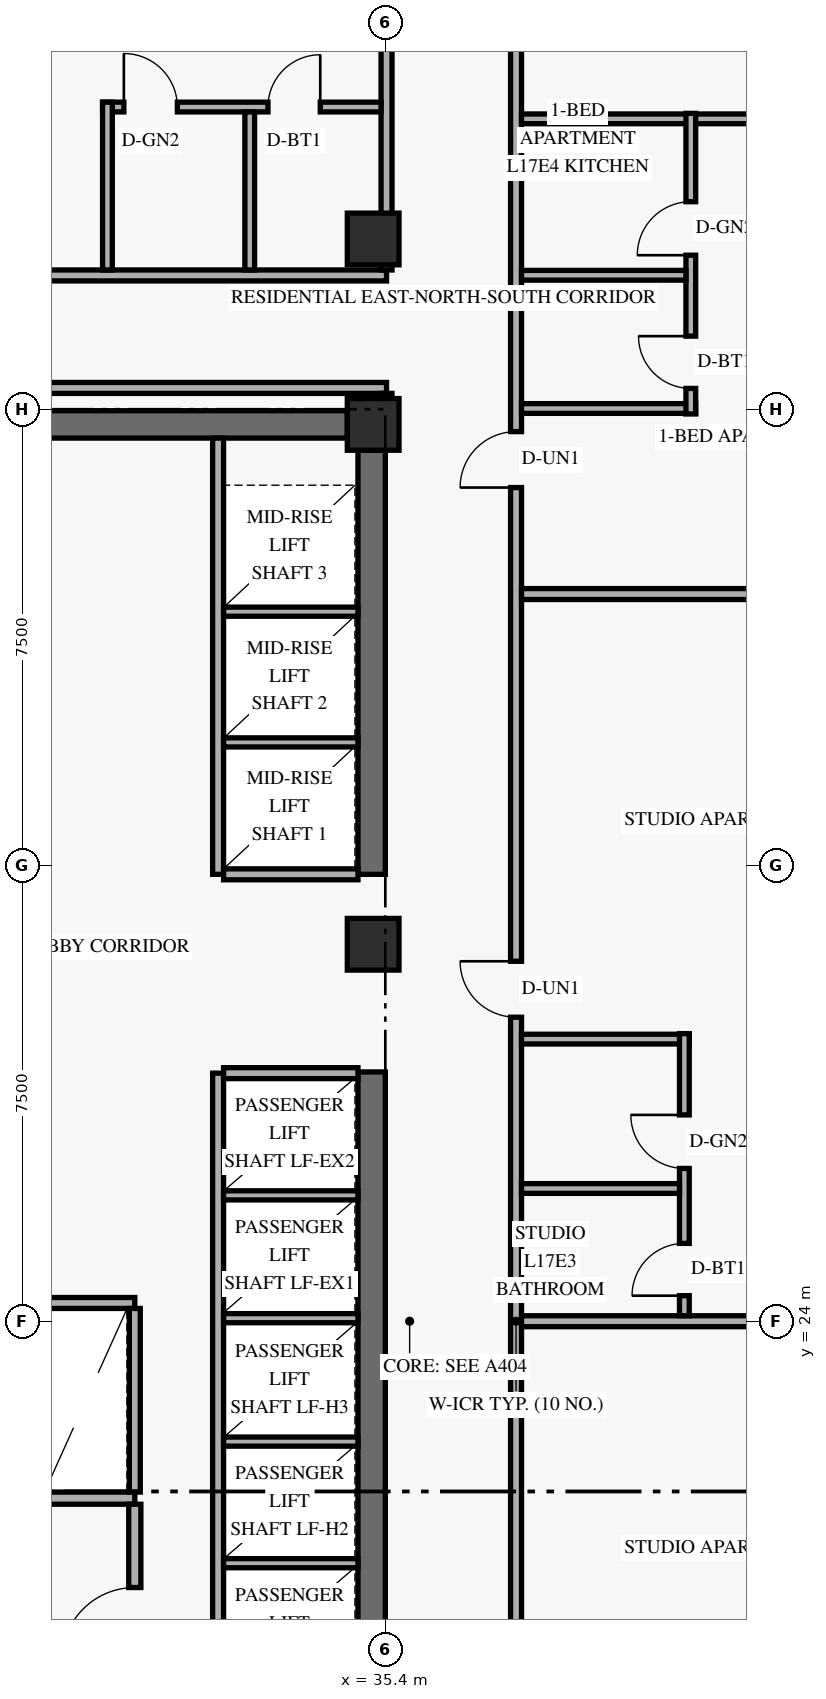
"""IFC4 building model, lengths in metres.
Left out: names, types, materials, properties, quantities, classifications, styles, units other than length and angle.
Written with IfcOpenShell. Run it as: python <this file> out.ifc"""

import sys

from ifc_helpers import new_model, si_unit, direction, frame, frame_2d, origin, origin_2d, place, context, subcontext, project, spatial, rectangle, extrude, element, fill, save


model = new_model("IFC4")
c1 = context("Model", 3, precision=1e-05, world=origin(), true_north=direction((0.0, 1.0)))
c2 = subcontext(c1, "Body", "Model", "MODEL_VIEW")
j1 = project(units=[si_unit("LENGTHUNIT", "METRE"), si_unit("PLANEANGLEUNIT", "RADIAN")], contexts=[c1])
p1 = place(None, origin())
s1 = spatial("IfcSite", under=j1, at=p1, CompositionType="ELEMENT")
p2 = place(p1, origin())
s2 = spatial("IfcBuilding", under=s1, at=p2, CompositionType="ELEMENT")
p3 = place(p2, frame((0.0, 0.0, 67.8)))
s3 = spatial("IfcBuildingStorey", under=s2, at=p3, CompositionType="ELEMENT", Elevation=67.8)
p4 = place(p3, frame((35.175, 17.975, 0.0), z_axis=(0.0, 0.0, 1.0), x_axis=(0.0, 1.0, 0.0)))
e1 = element("IfcWall", 1, at=p4, inside=s3, PredefinedType="SHEAR", context=c2, shape_type="SweptSolid", body=[
    extrude(rectangle(XDim=10.125, YDim=0.45, at=frame_2d((5.062, 0.0))), origin(), (0.0, 0.0, 1.0), 2.607),
])
p5 = place(p3, frame((35.175, 31.35, 0.0), z_axis=(0.0, 0.0, 1.0), x_axis=(0.0, 1.0, 0.0)))
e2 = element("IfcWall", 2, at=p5, inside=s3, PredefinedType="SHEAR", context=c2, shape_type="SweptSolid", body=[
    extrude(rectangle(XDim=6.975, YDim=0.45, at=frame_2d((3.487, 0.0))), origin(), (0.0, 0.0, 1.0), 2.607),
])
p6 = place(p3, frame((24.625, 38.75, 0.0), z_axis=(0.0, 0.0, 1.0), x_axis=(1.0, 0.0, 0.0)))
e3 = element("IfcWall", 3, at=p6, inside=s3, PredefinedType="SHEAR", context=c2, shape_type="SweptSolid", body=[
    extrude(rectangle(XDim=10.15, YDim=0.45, at=frame_2d((5.075, 0.0))), origin(), (0.0, 0.0, 1.0), 3.3),
])
for number, where, z_axis, x_axis in (
    (4, (35.2, 30.2, 0.0), (0.0, 0.0, 1.0), (1.0, 0.0, 0.0)),
    (5, (35.2, 38.75, 0.0), (0.0, 0.0, 1.0), (1.0, 0.0, 0.0)),
    (6, (35.2, 41.8, 0.0), (0.0, 0.0, 1.0), (1.0, 0.0, 0.0)),
):
    element("IfcColumn", number, at=place(p3, frame(where, z_axis=z_axis, x_axis=x_axis)), inside=s3, PredefinedType="COLUMN", context=c2, shape_type="SweptSolid", body=[
        extrude(rectangle(XDim=0.85, YDim=0.85, at=origin_2d()), origin(), (0.0, 0.0, 1.0), 3.6),
    ])
p7 = place(p3, frame((24.45, 21.09, 0.0), z_axis=(0.0, 0.0, 1.0), x_axis=(1.0, 0.0, 0.0)))
e7 = element("IfcWall", 7, at=p7, inside=s3, PredefinedType="STANDARD", context=c2, shape_type="SweptSolid", body=[
    extrude(rectangle(XDim=6.83, YDim=0.2, at=frame_2d((3.415, 0.0))), origin(), (0.0, 0.0, 1.0), 3.3),
])
p8 = place(p7, frame((0.72, 0.0, 0.0)))
e8 = element("IfcOpeningElement", 8, at=p8, cuts=e7, PredefinedType="OPENING", context=c2, shape_type="SweptSolid", body=[
    extrude(rectangle(XDim=1.1, YDim=2.2, at=frame_2d((0.55, 1.1))), frame((0.0, 0.11, 0.0), z_axis=(0.0, -1.0, 0.0), x_axis=(1.0, 0.0, 0.0)), (0.0, 0.0, 1.0), 0.22),
])
p9 = place(p7, frame((3.32, 0.0, 0.0)))
e9 = element("IfcOpeningElement", 9, at=p9, cuts=e7, PredefinedType="OPENING", context=c2, shape_type="SweptSolid", body=[
    extrude(rectangle(XDim=1.1, YDim=2.2, at=frame_2d((0.55, 1.1))), frame((0.0, 0.11, 0.0), z_axis=(0.0, -1.0, 0.0), x_axis=(1.0, 0.0, 0.0)), (0.0, 0.0, 1.0), 0.22),
])
p10 = place(p3, frame((31.28, 17.07, 0.0), z_axis=(0.0, 0.0, 1.0), x_axis=(0.0, 1.0, 0.0)))
e10 = element("IfcWall", 10, at=p10, inside=s3, PredefinedType="STANDARD", context=c2, shape_type="SweptSolid", body=[
    extrude(rectangle(XDim=3.92, YDim=0.2, at=frame_2d((1.96, 0.0))), origin(), (0.0, 0.0, 1.0), 2.589),
])
p11 = place(p10, frame((1.35, 0.0, 0.0)))
e11 = element("IfcOpeningElement", 11, at=p11, cuts=e10, PredefinedType="OPENING", context=c2, shape_type="SweptSolid", body=[
    extrude(rectangle(XDim=1.2, YDim=2.15, at=frame_2d((0.6, 1.075))), frame((0.0, 0.11, 0.0), z_axis=(0.0, -1.0, 0.0), x_axis=(1.0, 0.0, 0.0)), (0.0, 0.0, 1.0), 0.22),
])
p12 = place(p3, frame((24.45, 24.3, 0.0), z_axis=(0.0, 0.0, 1.0), x_axis=(1.0, 0.0, 0.0)))
e12 = element("IfcWall", 12, at=p12, inside=s3, PredefinedType="STANDARD", context=c2, shape_type="SweptSolid", body=[
    extrude(rectangle(XDim=6.83, YDim=0.18, at=frame_2d((3.415, 0.0))), origin(), (0.0, 0.0, 1.0), 3.3),
])
p13 = place(p3, frame((31.28, 21.19, 0.0), z_axis=(0.0, 0.0, 1.0), x_axis=(0.0, 1.0, 0.0)))
e13 = element("IfcWall", 13, at=p13, inside=s3, PredefinedType="STANDARD", context=c2, shape_type="SweptSolid", body=[
    extrude(rectangle(XDim=3.02, YDim=0.18, at=frame_2d((1.51, 0.0))), origin(), (0.0, 0.0, 1.0), 3.3),
])
p14 = place(p3, frame((32.65, 18.02, 0.0), z_axis=(0.0, 0.0, 1.0), x_axis=(0.0, 1.0, 0.0)))
e14 = element("IfcWall", 14, at=p14, inside=s3, PredefinedType="STANDARD", context=c2, shape_type="SweptSolid", body=[
    extrude(rectangle(XDim=10.06, YDim=0.18, at=frame_2d((5.03, 0.0))), origin(), (0.0, 0.0, 1.0), 3.3),
])
p15 = place(p3, frame((32.74, 28.08, 0.0), z_axis=(0.0, 0.0, 1.0), x_axis=(1.0, 0.0, 0.0)))
e15 = element("IfcWall", 15, at=p15, inside=s3, PredefinedType="STANDARD", context=c2, shape_type="SweptSolid", body=[
    extrude(rectangle(XDim=2.21, YDim=0.18, at=frame_2d((1.105, 0.0))), origin(), (0.0, 0.0, 1.0), 3.3),
])
for number, where, z_axis, x_axis in (
    (16, (32.74, 20.02, 0.0), (0.0, 0.0, 1.0), (1.0, 0.0, 0.0)),
    (17, (32.74, 22.02, 0.0), (0.0, 0.0, 1.0), (1.0, 0.0, 0.0)),
    (18, (32.74, 24.05, 0.0), (0.0, 0.0, 1.0), (1.0, 0.0, 0.0)),
    (19, (32.74, 26.07, 0.0), (0.0, 0.0, 1.0), (1.0, 0.0, 0.0)),
):
    element("IfcWall", number, at=place(p3, frame(where, z_axis=z_axis, x_axis=x_axis)), inside=s3, PredefinedType="STANDARD", context=c2, shape_type="SweptSolid", body=[
        extrude(rectangle(XDim=2.21, YDim=0.15, at=frame_2d((1.105, 0.0))), origin(), (0.0, 0.0, 1.0), 3.3),
    ])
p16 = place(p3, frame((32.65, 31.35, 0.0), z_axis=(0.0, 0.0, 1.0), x_axis=(0.0, 1.0, 0.0)))
e20 = element("IfcWall", 20, at=p16, inside=s3, PredefinedType="STANDARD", context=c2, shape_type="SweptSolid", body=[
    extrude(rectangle(XDim=7.175, YDim=0.18, at=frame_2d((3.587, 0.0))), origin(), (0.0, 0.0, 1.0), 3.3),
])
p17 = place(p3, frame((32.74, 31.35, 0.0), z_axis=(0.0, 0.0, 1.0), x_axis=(1.0, 0.0, 0.0)))
e21 = element("IfcWall", 21, at=p17, inside=s3, PredefinedType="STANDARD", context=c2, shape_type="SweptSolid", body=[
    extrude(rectangle(XDim=2.21, YDim=0.18, at=frame_2d((1.105, 0.0))), origin(), (0.0, 0.0, 1.0), 3.3),
])
for number, where, z_axis, x_axis in (
    (22, (32.74, 33.52, 0.0), (0.0, 0.0, 1.0), (1.0, 0.0, 0.0)),
    (23, (32.74, 35.67, 0.0), (0.0, 0.0, 1.0), (1.0, 0.0, 0.0)),
):
    element("IfcWall", number, at=place(p3, frame(where, z_axis=z_axis, x_axis=x_axis)), inside=s3, PredefinedType="STANDARD", context=c2, shape_type="SweptSolid", body=[
        extrude(rectangle(XDim=2.21, YDim=0.15, at=frame_2d((1.105, 0.0))), origin(), (0.0, 0.0, 1.0), 3.3),
    ])
p18 = place(p3, frame((37.55, 1.29, 0.0), z_axis=(0.0, 0.0, 1.0), x_axis=(0.0, 1.0, 0.0)))
e24 = element("IfcWall", 24, at=p18, inside=s3, PredefinedType="STANDARD", context=c2, shape_type="SweptSolid", body=[
    extrude(rectangle(XDim=45.42, YDim=0.18, at=frame_2d((22.71, 0.0))), origin(), (0.0, 0.0, 1.0), 2.589),
])
p19 = place(p18, frame((4.81, 0.0, 0.0)))
e25 = element("IfcOpeningElement", 25, at=p19, cuts=e24, PredefinedType="OPENING", context=c2, shape_type="SweptSolid", body=[
    extrude(rectangle(XDim=0.92, YDim=2.15, at=frame_2d((0.46, 1.075))), frame((0.0, 0.1, 0.0), z_axis=(0.0, -1.0, 0.0), x_axis=(1.0, 0.0, 0.0)), (0.0, 0.0, 1.0), 0.2),
])
p20 = place(p18, frame((15.75, 0.0, 0.0)))
e26 = element("IfcOpeningElement", 26, at=p20, cuts=e24, PredefinedType="OPENING", context=c2, shape_type="SweptSolid", body=[
    extrude(rectangle(XDim=0.92, YDim=2.15, at=frame_2d((0.46, 1.075))), frame((0.0, 0.1, 0.0), z_axis=(0.0, -1.0, 0.0), x_axis=(1.0, 0.0, 0.0)), (0.0, 0.0, 1.0), 0.2),
])
p21 = place(p18, frame((27.71, 0.0, 0.0)))
e27 = element("IfcOpeningElement", 27, at=p21, cuts=e24, PredefinedType="OPENING", context=c2, shape_type="SweptSolid", body=[
    extrude(rectangle(XDim=0.92, YDim=2.15, at=frame_2d((0.46, 1.075))), frame((0.0, 0.1, 0.0), z_axis=(0.0, -1.0, 0.0), x_axis=(1.0, 0.0, 0.0)), (0.0, 0.0, 1.0), 0.2),
])
p22 = place(p18, frame((36.422, 0.0, 0.0)))
e28 = element("IfcOpeningElement", 28, at=p22, cuts=e24, PredefinedType="OPENING", context=c2, shape_type="SweptSolid", body=[
    extrude(rectangle(XDim=0.92, YDim=2.15, at=frame_2d((0.46, 1.075))), frame((0.0, 0.1, 0.0), z_axis=(0.0, -1.0, 0.0), x_axis=(1.0, 0.0, 0.0)), (0.0, 0.0, 1.0), 0.2),
])
p23 = place(p3, frame((14.1, 41.2, 0.0), z_axis=(0.0, 0.0, 1.0), x_axis=(1.0, 0.0, 0.0)))
e29 = element("IfcWall", 29, at=p23, inside=s3, PredefinedType="STANDARD", context=c2, shape_type="SweptSolid", body=[
    extrude(rectangle(XDim=21.32, YDim=0.18, at=frame_2d((10.66, 0.0))), origin(), (0.0, 0.0, 1.0), 2.589),
])
p24 = place(p23, frame((0.44, 0.0, 0.0)))
e30 = element("IfcOpeningElement", 30, at=p24, cuts=e29, PredefinedType="OPENING", context=c2, shape_type="SweptSolid", body=[
    extrude(rectangle(XDim=0.92, YDim=2.15, at=frame_2d((0.46, 1.075))), frame((0.0, 0.1, 0.0), z_axis=(0.0, -1.0, 0.0), x_axis=(1.0, 0.0, 0.0)), (0.0, 0.0, 1.0), 0.2),
])
p25 = place(p23, frame((10.631, 0.0, 0.0)))
e31 = element("IfcOpeningElement", 31, at=p25, cuts=e29, PredefinedType="OPENING", context=c2, shape_type="SweptSolid", body=[
    extrude(rectangle(XDim=0.95, YDim=2.15, at=frame_2d((0.475, 1.075))), frame((0.0, 0.1, 0.0), z_axis=(0.0, -1.0, 0.0), x_axis=(1.0, 0.0, 0.0)), (0.0, 0.0, 1.0), 0.2),
])
p26 = place(p23, frame((14.511, 0.0, 0.0)))
e32 = element("IfcOpeningElement", 32, at=p26, cuts=e29, PredefinedType="OPENING", context=c2, shape_type="SweptSolid", body=[
    extrude(rectangle(XDim=0.92, YDim=2.15, at=frame_2d((0.46, 1.075))), frame((0.0, 0.1, 0.0), z_axis=(0.0, -1.0, 0.0), x_axis=(1.0, 0.0, 0.0)), (0.0, 0.0, 1.0), 0.2),
])
p27 = place(p3, frame((23.75, 39.35, 0.0), z_axis=(0.0, 0.0, 1.0), x_axis=(1.0, 0.0, 0.0)))
e33 = element("IfcWall", 33, at=p27, inside=s3, PredefinedType="STANDARD", context=c2, shape_type="SweptSolid", body=[
    extrude(rectangle(XDim=11.67, YDim=0.18, at=frame_2d((5.835, 0.0))), origin(), (0.0, 0.0, 1.0), 2.589),
])
p28 = place(p3, frame((35.42, 38.75, 0.0), z_axis=(0.0, 0.0, 1.0), x_axis=(0.0, 1.0, 0.0)))
e34 = element("IfcWall", 34, at=p28, inside=s3, PredefinedType="STANDARD", context=c2, shape_type="SweptSolid", body=[
    extrude(rectangle(XDim=0.51, YDim=0.18, at=frame_2d((0.255, 0.0))), origin(), (0.0, 0.0, 1.0), 3.3),
])
p29 = place(p3, frame((35.42, 41.29, 0.0), z_axis=(0.0, 0.0, 1.0), x_axis=(0.0, 1.0, 0.0)))
e35 = element("IfcWall", 35, at=p29, inside=s3, PredefinedType="PARTITIONING", context=c2, shape_type="SweptSolid", body=[
    extrude(rectangle(XDim=5.42, YDim=0.18, at=frame_2d((2.71, 0.0))), origin(), (0.0, 0.0, 1.0), 3.3),
])
p30 = place(p3, frame((37.64, 24.0, 0.0), z_axis=(0.0, 0.0, 1.0), x_axis=(1.0, 0.0, 0.0)))
e36 = element("IfcWall", 36, at=p30, inside=s3, PredefinedType="PARTITIONING", context=c2, shape_type="SweptSolid", body=[
    extrude(rectangle(XDim=10.67, YDim=0.18, at=frame_2d((5.335, 0.0))), origin(), (0.0, 0.0, 1.0), 2.589),
])
p31 = place(p3, frame((37.64, 28.64, 0.0), z_axis=(0.0, 0.0, 1.0), x_axis=(1.0, 0.0, 0.0)))
e37 = element("IfcWall", 37, at=p31, inside=s3, PredefinedType="PLUMBINGWALL", context=c2, shape_type="SweptSolid", body=[
    extrude(rectangle(XDim=2.758, YDim=0.16, at=frame_2d((1.379, 0.0))), origin(), (0.0, 0.0, 1.0), 3.3),
])
p32 = place(p3, frame((40.318, 24.09, 0.0), z_axis=(0.0, 0.0, 1.0), x_axis=(0.0, 1.0, 0.0)))
e38 = element("IfcWall", 38, at=p32, inside=s3, PredefinedType="PLUMBINGWALL", context=c2, shape_type="SweptSolid", body=[
    extrude(rectangle(XDim=4.64, YDim=0.16, at=frame_2d((2.32, 0.0))), origin(), (0.0, 0.0, 1.0), 3.3),
])
p33 = place(p32, frame((0.33, 0.0, 0.0)))
e39 = element("IfcOpeningElement", 39, at=p33, cuts=e38, PredefinedType="OPENING", context=c2, shape_type="SweptSolid", body=[
    extrude(rectangle(XDim=0.86, YDim=2.12, at=frame_2d((0.43, 1.06))), frame((0.0, 0.09, 0.0), z_axis=(0.0, -1.0, 0.0), x_axis=(1.0, 0.0, 0.0)), (0.0, 0.0, 1.0), 0.18),
])
p34 = place(p32, frame((2.423, 0.0, 0.0)))
e40 = element("IfcOpeningElement", 40, at=p34, cuts=e38, PredefinedType="OPENING", context=c2, shape_type="SweptSolid", body=[
    extrude(rectangle(XDim=0.88, YDim=2.12, at=frame_2d((0.44, 1.06))), frame((0.0, 0.09, 0.0), z_axis=(0.0, -1.0, 0.0), x_axis=(1.0, 0.0, 0.0)), (0.0, 0.0, 1.0), 0.18),
])
p35 = place(p3, frame((37.64, 26.183, 0.0), z_axis=(0.0, 0.0, 1.0), x_axis=(1.0, 0.0, 0.0)))
e41 = element("IfcWall", 41, at=p35, inside=s3, PredefinedType="PLUMBINGWALL", context=c2, shape_type="SweptSolid", body=[
    extrude(rectangle(XDim=2.598, YDim=0.16, at=frame_2d((1.299, 0.0))), origin(), (0.0, 0.0, 1.0), 3.3),
])
p36 = place(p3, frame((37.64, 35.96, 0.0), z_axis=(0.0, 0.0, 1.0), x_axis=(1.0, 0.0, 0.0)))
e42 = element("IfcWall", 42, at=p36, inside=s3, PredefinedType="PARTITIONING", context=c2, shape_type="SweptSolid", body=[
    extrude(rectangle(XDim=10.67, YDim=0.18, at=frame_2d((5.335, 0.0))), origin(), (0.0, 0.0, 1.0), 2.589),
])
p37 = place(p3, frame((37.64, 43.776, 0.0), z_axis=(0.0, 0.0, 1.0), x_axis=(1.0, 0.0, 0.0)))
e43 = element("IfcWall", 43, at=p37, inside=s3, PredefinedType="PARTITIONING", context=c2, shape_type="SweptSolid", body=[
    extrude(rectangle(XDim=10.595, YDim=0.16, at=frame_2d((5.297, 0.0))), origin(), (0.0, 0.0, 1.0), 3.3),
])
p38 = place(p37, frame((4.947, 0.0, 0.0)))
e44 = element("IfcOpeningElement", 44, at=p38, cuts=e43, PredefinedType="OPENING", context=c2, shape_type="SweptSolid", body=[
    extrude(rectangle(XDim=0.9, YDim=2.14, at=frame_2d((0.45, 1.07))), frame((0.0, 0.09, 0.0), z_axis=(0.0, -1.0, 0.0), x_axis=(1.0, 0.0, 0.0)), (0.0, 0.0, 1.0), 0.18),
])
p39 = place(p3, frame((37.64, 39.012, 0.0), z_axis=(0.0, 0.0, 1.0), x_axis=(1.0, 0.0, 0.0)))
e45 = element("IfcWall", 45, at=p39, inside=s3, PredefinedType="PLUMBINGWALL", context=c2, shape_type="SweptSolid", body=[
    extrude(rectangle(XDim=2.864, YDim=0.16, at=frame_2d((1.432, 0.0))), origin(), (0.0, 0.0, 1.0), 3.3),
])
p40 = place(p3, frame((40.424, 38.922, 0.0), z_axis=(0.0, 0.0, 1.0), x_axis=(0.0, 1.0, 0.0)))
e46 = element("IfcWall", 46, at=p40, inside=s3, PredefinedType="PLUMBINGWALL", context=c2, shape_type="SweptSolid", body=[
    extrude(rectangle(XDim=4.944, YDim=0.16, at=frame_2d((2.472, 0.0))), origin(), (0.0, 0.0, 1.0), 2.749),
])
p41 = place(p40, frame((0.42, 0.0, 0.0)))
e47 = element("IfcOpeningElement", 47, at=p41, cuts=e46, PredefinedType="OPENING", context=c2, shape_type="SweptSolid", body=[
    extrude(rectangle(XDim=0.86, YDim=2.12, at=frame_2d((0.43, 1.06))), frame((0.0, 0.09, 0.0), z_axis=(0.0, -1.0, 0.0), x_axis=(1.0, 0.0, 0.0)), (0.0, 0.0, 1.0), 0.18),
])
p42 = place(p40, frame((2.611, 0.0, 0.0)))
e48 = element("IfcOpeningElement", 48, at=p42, cuts=e46, PredefinedType="OPENING", context=c2, shape_type="SweptSolid", body=[
    extrude(rectangle(XDim=0.88, YDim=2.12, at=frame_2d((0.44, 1.06))), frame((0.0, 0.09, 0.0), z_axis=(0.0, -1.0, 0.0), x_axis=(1.0, 0.0, 0.0)), (0.0, 0.0, 1.0), 0.18),
])
p43 = place(p3, frame((37.64, 41.203, 0.0), z_axis=(0.0, 0.0, 1.0), x_axis=(1.0, 0.0, 0.0)))
e49 = element("IfcWall", 49, at=p43, inside=s3, PredefinedType="PLUMBINGWALL", context=c2, shape_type="SweptSolid", body=[
    extrude(rectangle(XDim=2.704, YDim=0.16, at=frame_2d((1.352, 0.0))), origin(), (0.0, 0.0, 1.0), 3.3),
])
p44 = place(p3, frame((30.75, 43.97, 0.0), z_axis=(0.0, 0.0, 1.0), x_axis=(1.0, 0.0, 0.0)))
e50 = element("IfcWall", 50, at=p44, inside=s3, PredefinedType="PLUMBINGWALL", context=c2, shape_type="SweptSolid", body=[
    extrude(rectangle(XDim=4.58, YDim=0.16, at=frame_2d((2.29, 0.0))), origin(), (0.0, 0.0, 1.0), 3.3),
])
p45 = place(p44, frame((0.35, 0.0, 0.0)))
e51 = element("IfcOpeningElement", 51, at=p45, cuts=e50, PredefinedType="OPENING", context=c2, shape_type="SweptSolid", body=[
    extrude(rectangle(XDim=0.88, YDim=2.12, at=frame_2d((0.44, 1.06))), frame((0.0, 0.09, 0.0), z_axis=(0.0, -1.0, 0.0), x_axis=(1.0, 0.0, 0.0)), (0.0, 0.0, 1.0), 0.18),
])
p46 = place(p44, frame((2.72, 0.0, 0.0)))
e52 = element("IfcOpeningElement", 52, at=p46, cuts=e50, PredefinedType="OPENING", context=c2, shape_type="SweptSolid", body=[
    extrude(rectangle(XDim=0.86, YDim=2.12, at=frame_2d((0.43, 1.06))), frame((0.0, 0.09, 0.0), z_axis=(0.0, -1.0, 0.0), x_axis=(1.0, 0.0, 0.0)), (0.0, 0.0, 1.0), 0.18),
])
p47 = place(p3, frame((30.83, 41.29, 0.0), z_axis=(0.0, 0.0, 1.0), x_axis=(0.0, 1.0, 0.0)))
e53 = element("IfcWall", 53, at=p47, inside=s3, PredefinedType="PLUMBINGWALL", context=c2, shape_type="SweptSolid", body=[
    extrude(rectangle(XDim=2.76, YDim=0.16, at=frame_2d((1.38, 0.0))), origin(), (0.0, 0.0, 1.0), 2.749),
])
p48 = place(p3, frame((33.17, 41.29, 0.0), z_axis=(0.0, 0.0, 1.0), x_axis=(0.0, 1.0, 0.0)))
e54 = element("IfcWall", 54, at=p48, inside=s3, PredefinedType="PLUMBINGWALL", context=c2, shape_type="SweptSolid", body=[
    extrude(rectangle(XDim=2.6, YDim=0.16, at=frame_2d((1.3, 0.0))), origin(), (0.0, 0.0, 1.0), 2.749),
])
p49 = place(p11, origin())
e55 = element("IfcDoor", 55, at=p49, inside=s3, OperationType="SINGLE_SWING_LEFT", PredefinedType="DOOR", context=c2, shape_type="SweptSolid", body=[
    extrude(rectangle(XDim=1.2, YDim=2.15, at=frame_2d((0.6, 1.075))), frame((0.0, 0.025, 0.0), z_axis=(0.0, -1.0, 0.0), x_axis=(1.0, 0.0, 0.0)), (0.0, 0.0, 1.0), 0.05),
])
fill(e11, e55)
p50 = place(p21, origin())
e56 = element("IfcDoor", 56, at=p50, inside=s3, OperationType="SINGLE_SWING_RIGHT", PredefinedType="DOOR", context=c2, shape_type="SweptSolid", body=[
    extrude(rectangle(XDim=0.92, YDim=2.15, at=frame_2d((0.46, 1.075))), frame((0.0, 0.025, 0.0), z_axis=(0.0, -1.0, 0.0), x_axis=(1.0, 0.0, 0.0)), (0.0, 0.0, 1.0), 0.05),
])
fill(e27, e56)
p51 = place(p33, origin())
e57 = element("IfcDoor", 57, at=p51, inside=s3, OperationType="SINGLE_SWING_LEFT", PredefinedType="DOOR", context=c2, shape_type="SweptSolid", body=[
    extrude(rectangle(XDim=0.86, YDim=2.12, at=frame_2d((0.43, 1.06))), frame((0.0, 0.025, 0.0), z_axis=(0.0, -1.0, 0.0), x_axis=(1.0, 0.0, 0.0)), (0.0, 0.0, 1.0), 0.05),
])
fill(e39, e57)
p52 = place(p34, origin())
e58 = element("IfcDoor", 58, at=p52, inside=s3, OperationType="SINGLE_SWING_RIGHT", PredefinedType="DOOR", context=c2, shape_type="SweptSolid", body=[
    extrude(rectangle(XDim=0.88, YDim=2.12, at=frame_2d((0.44, 1.06))), frame((0.0, 0.025, 0.0), z_axis=(0.0, -1.0, 0.0), x_axis=(1.0, 0.0, 0.0)), (0.0, 0.0, 1.0), 0.05),
])
fill(e40, e58)
p53 = place(p22, origin())
e59 = element("IfcDoor", 59, at=p53, inside=s3, OperationType="SINGLE_SWING_LEFT", PredefinedType="DOOR", context=c2, shape_type="SweptSolid", body=[
    extrude(rectangle(XDim=0.92, YDim=2.15, at=frame_2d((0.46, 1.075))), frame((0.0, 0.025, 0.0), z_axis=(0.0, -1.0, 0.0), x_axis=(1.0, 0.0, 0.0)), (0.0, 0.0, 1.0), 0.05),
])
fill(e28, e59)
p54 = place(p41, origin())
e60 = element("IfcDoor", 60, at=p54, inside=s3, OperationType="SINGLE_SWING_RIGHT", PredefinedType="DOOR", context=c2, shape_type="SweptSolid", body=[
    extrude(rectangle(XDim=0.86, YDim=2.12, at=frame_2d((0.43, 1.06))), frame((0.0, 0.025, 0.0), z_axis=(0.0, -1.0, 0.0), x_axis=(1.0, 0.0, 0.0)), (0.0, 0.0, 1.0), 0.05),
])
fill(e47, e60)
p55 = place(p42, origin())
e61 = element("IfcDoor", 61, at=p55, inside=s3, OperationType="SINGLE_SWING_LEFT", PredefinedType="DOOR", context=c2, shape_type="SweptSolid", body=[
    extrude(rectangle(XDim=0.88, YDim=2.12, at=frame_2d((0.44, 1.06))), frame((0.0, 0.025, 0.0), z_axis=(0.0, -1.0, 0.0), x_axis=(1.0, 0.0, 0.0)), (0.0, 0.0, 1.0), 0.05),
])
fill(e48, e61)
p56 = place(p45, origin())
e62 = element("IfcDoor", 62, at=p56, inside=s3, OperationType="SINGLE_SWING_LEFT", PredefinedType="DOOR", context=c2, shape_type="SweptSolid", body=[
    extrude(rectangle(XDim=0.88, YDim=2.12, at=frame_2d((0.44, 1.06))), frame((0.0, 0.025, 0.0), z_axis=(0.0, -1.0, 0.0), x_axis=(1.0, 0.0, 0.0)), (0.0, 0.0, 1.0), 0.05),
])
fill(e51, e62)
p57 = place(p46, origin())
e63 = element("IfcDoor", 63, at=p57, inside=s3, OperationType="SINGLE_SWING_RIGHT", PredefinedType="DOOR", context=c2, shape_type="SweptSolid", body=[
    extrude(rectangle(XDim=0.86, YDim=2.12, at=frame_2d((0.43, 1.06))), frame((0.0, 0.025, 0.0), z_axis=(0.0, -1.0, 0.0), x_axis=(1.0, 0.0, 0.0)), (0.0, 0.0, 1.0), 0.05),
])
fill(e52, e63)
save(model, sys.argv[1])
